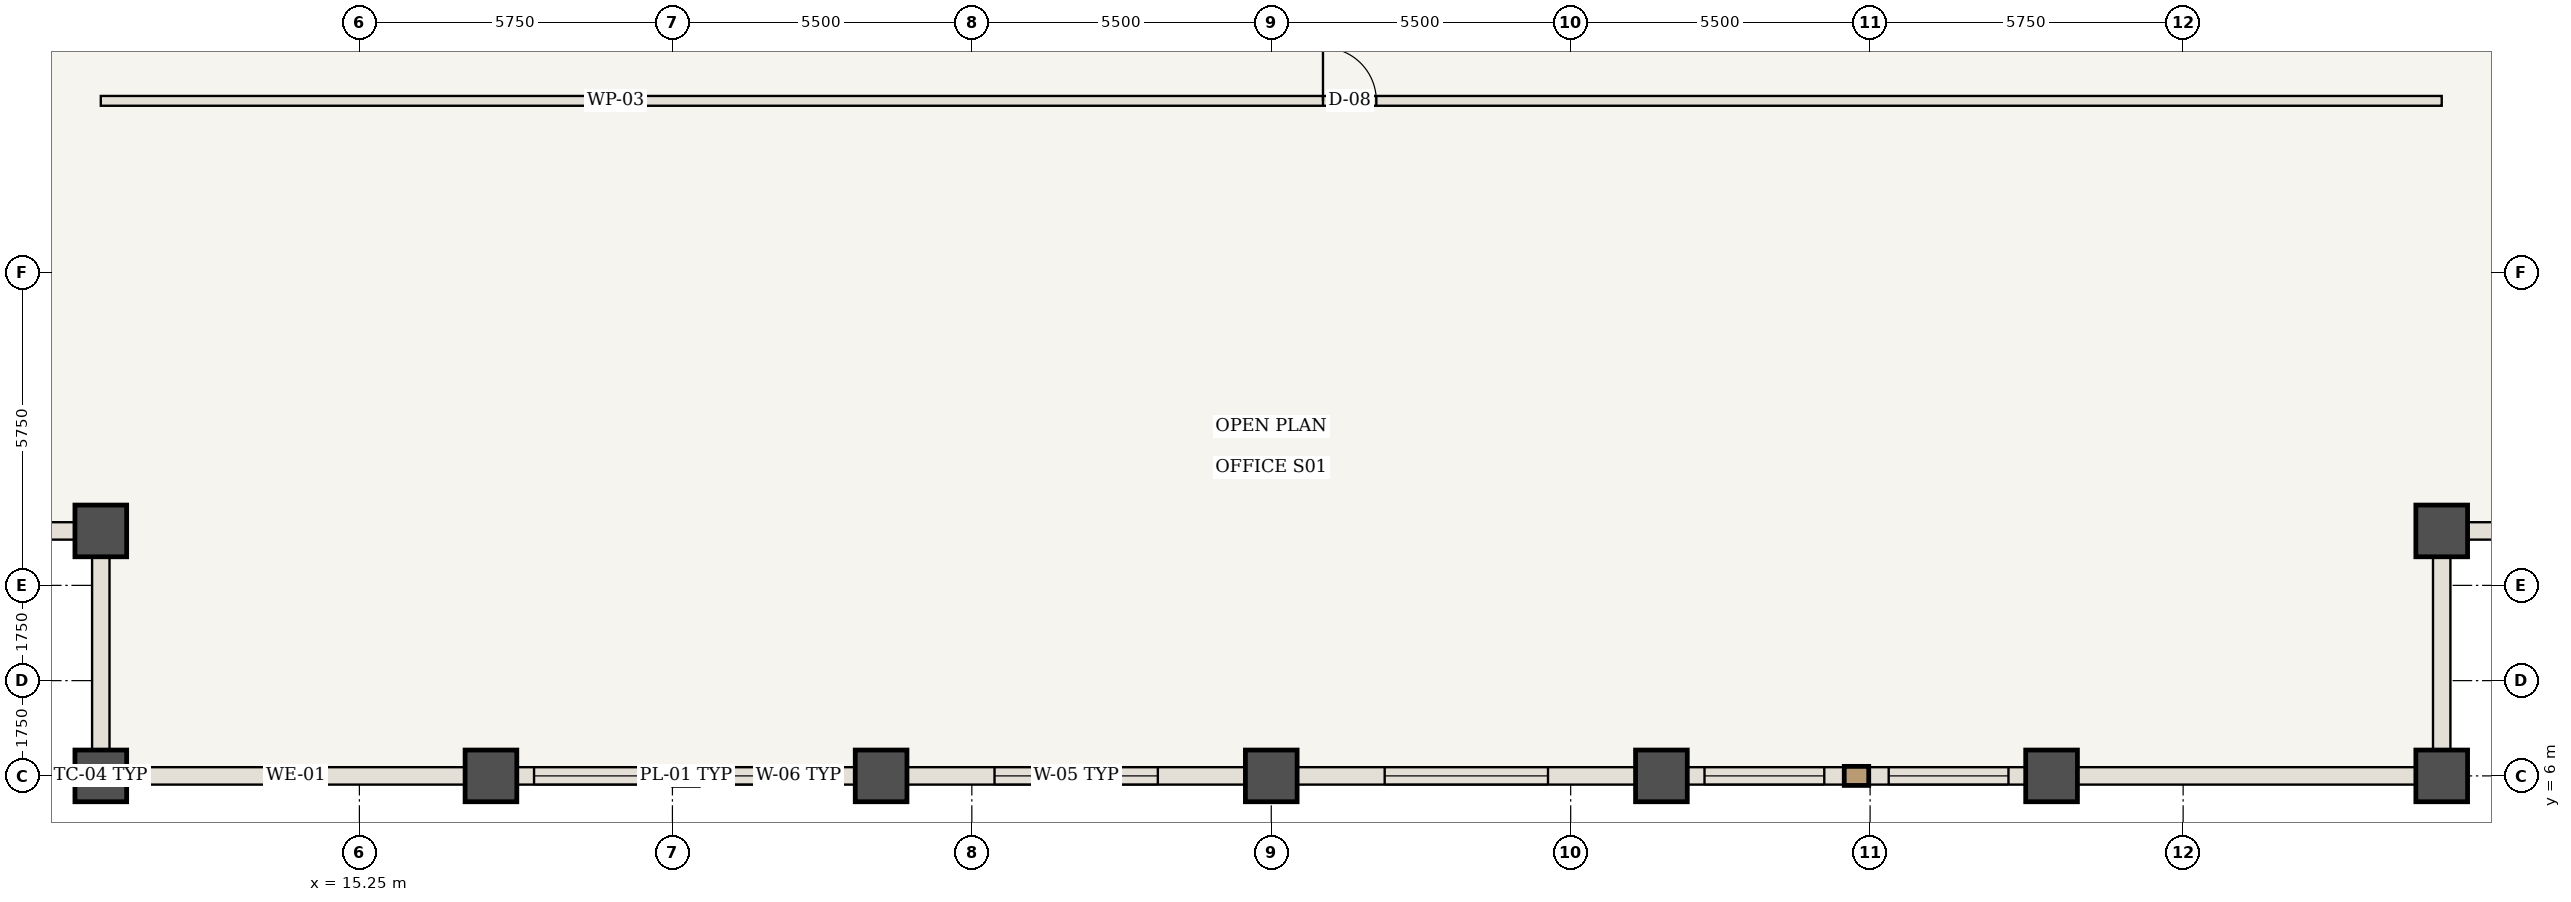
"""IFC4 building model, lengths in metres.
Left out: names, types, materials, properties, quantities, classifications, styles, units other than length and angle.
Written with IfcOpenShell. Run it as: python <this file> out.ifc"""

import sys

from ifc_helpers import new_model, si_unit, direction, frame, frame_2d, origin, origin_2d, place, context, subcontext, project, spatial, rectangle, extrude, element, fill, save


model = new_model("IFC4")
c1 = context("Model", 3, precision=1e-05, world=origin(), true_north=direction((0.0, 1.0)))
c2 = subcontext(c1, "Body", "Model", "MODEL_VIEW")
j1 = project(units=[si_unit("LENGTHUNIT", "METRE"), si_unit("PLANEANGLEUNIT", "RADIAN")], contexts=[c1])
p1 = place(None, origin())
s1 = spatial("IfcSite", under=j1, at=p1, CompositionType="ELEMENT")
p2 = place(p1, origin())
s2 = spatial("IfcBuilding", under=s1, at=p2, CompositionType="ELEMENT")
p3 = place(p2, frame((0.0, 0.0, 118.3)))
s3 = spatial("IfcBuildingStorey", under=s2, at=p3, CompositionType="ELEMENT", Elevation=118.3)
for number, where, z_axis, x_axis in (
    (1, (10.5, 6.0, 0.0), (0.0, 0.0, 1.0), (1.0, 0.0, 0.0)),
    (2, (10.5, 10.5, 0.0), (0.0, 0.0, 1.0), (1.0, 0.0, 0.0)),
    (3, (53.5, 6.0, 0.0), (0.0, 0.0, 1.0), (1.0, 0.0, 0.0)),
    (4, (53.5, 10.5, 0.0), (0.0, 0.0, 1.0), (1.0, 0.0, 0.0)),
    (5, (17.667, 6.0, 0.0), (0.0, 0.0, 1.0), (1.0, 0.0, 0.0)),
    (6, (24.833, 6.0, 0.0), (0.0, 0.0, 1.0), (1.0, 0.0, 0.0)),
    (7, (32.0, 6.0, 0.0), (0.0, 0.0, 1.0), (1.0, 0.0, 0.0)),
    (8, (39.167, 6.0, 0.0), (0.0, 0.0, 1.0), (1.0, 0.0, 0.0)),
    (9, (46.333, 6.0, 0.0), (0.0, 0.0, 1.0), (1.0, 0.0, 0.0)),
):
    element("IfcColumn", number, at=place(p3, frame(where, z_axis=z_axis, x_axis=x_axis)), inside=s3, PredefinedType="COLUMN", context=c2, shape_type="SweptSolid", body=[
        extrude(rectangle(XDim=0.95, YDim=0.95, at=origin_2d()), origin(), (0.0, 0.0, 1.0), 3.85),
    ])
p4 = place(p3, frame((10.5, 18.4, 0.0), z_axis=(0.0, 0.0, 1.0), x_axis=(1.0, 0.0, 0.0)))
e10 = element("IfcWall", 10, at=p4, inside=s3, PredefinedType="STANDARD", context=c2, shape_type="SweptSolid", body=[
    extrude(rectangle(XDim=43.0, YDim=0.18, at=frame_2d((21.5, 0.0))), origin(), (0.0, 0.0, 1.0), 3.685),
])
p5 = place(p4, frame((22.45, 0.0, 0.0)))
e11 = element("IfcOpeningElement", 11, at=p5, cuts=e10, PredefinedType="OPENING", context=c2, shape_type="SweptSolid", body=[
    extrude(rectangle(XDim=0.98, YDim=2.2, at=frame_2d((0.49, 1.1))), frame((0.0, 0.1, 0.0), z_axis=(0.0, -1.0, 0.0), x_axis=(1.0, 0.0, 0.0)), (0.0, 0.0, 1.0), 0.2),
])
p6 = place(p3, frame((17.667, 6.0, 0.0), z_axis=(0.0, 0.0, 1.0), x_axis=(-1.0, 0.0, 0.0)))
e12 = element("IfcWall", 12, at=p6, inside=s3, PredefinedType="USERDEFINED", context=c2, shape_type="SweptSolid", body=[
    extrude(rectangle(XDim=7.167, YDim=0.32, at=frame_2d((3.583, 0.0))), origin(), (0.0, 0.0, 1.0), 2.885),
])
p7 = place(p3, frame((24.833, 6.0, 0.0), z_axis=(0.0, 0.0, 1.0), x_axis=(-1.0, 0.0, 0.0)))
e13 = element("IfcWall", 13, at=p7, inside=s3, PredefinedType="USERDEFINED", context=c2, shape_type="SweptSolid", body=[
    extrude(rectangle(XDim=7.167, YDim=0.32, at=frame_2d((3.583, 0.0))), origin(), (0.0, 0.0, 1.0), 2.885),
])
p8 = place(p7, frame((0.792, 0.0, 0.85)))
e14 = element("IfcOpeningElement", 14, at=p8, cuts=e13, PredefinedType="OPENING", context=c2, shape_type="SweptSolid", body=[
    extrude(rectangle(XDim=2.2, YDim=1.835, at=frame_2d((1.1, 0.917))), frame((0.0, 0.17, 0.0), z_axis=(0.0, -1.0, 0.0), x_axis=(1.0, 0.0, 0.0)), (0.0, 0.0, 1.0), 0.34),
])
p9 = place(p7, frame((4.175, 0.0, 0.85)))
e15 = element("IfcOpeningElement", 15, at=p9, cuts=e13, PredefinedType="OPENING", context=c2, shape_type="SweptSolid", body=[
    extrude(rectangle(XDim=2.2, YDim=1.835, at=frame_2d((1.1, 0.917))), frame((0.0, 0.17, 0.0), z_axis=(0.0, -1.0, 0.0), x_axis=(1.0, 0.0, 0.0)), (0.0, 0.0, 1.0), 0.34),
])
p10 = place(p3, frame((32.0, 6.0, 0.0), z_axis=(0.0, 0.0, 1.0), x_axis=(-1.0, 0.0, 0.0)))
e16 = element("IfcWall", 16, at=p10, inside=s3, PredefinedType="USERDEFINED", context=c2, shape_type="SweptSolid", body=[
    extrude(rectangle(XDim=7.167, YDim=0.32, at=frame_2d((3.583, 0.0))), origin(), (0.0, 0.0, 1.0), 2.885),
])
p11 = place(p10, frame((2.083, 0.0, 0.85)))
e17 = element("IfcOpeningElement", 17, at=p11, cuts=e16, PredefinedType="OPENING", context=c2, shape_type="SweptSolid", body=[
    extrude(rectangle(XDim=3.0, YDim=1.835, at=frame_2d((1.5, 0.917))), frame((0.0, 0.17, 0.0), z_axis=(0.0, -1.0, 0.0), x_axis=(1.0, 0.0, 0.0)), (0.0, 0.0, 1.0), 0.34),
])
p12 = place(p3, frame((39.167, 6.0, 0.0), z_axis=(0.0, 0.0, 1.0), x_axis=(-1.0, 0.0, 0.0)))
e18 = element("IfcWall", 18, at=p12, inside=s3, PredefinedType="USERDEFINED", context=c2, shape_type="SweptSolid", body=[
    extrude(rectangle(XDim=7.167, YDim=0.32, at=frame_2d((3.583, 0.0))), origin(), (0.0, 0.0, 1.0), 2.885),
])
p13 = place(p12, frame((2.083, 0.0, 0.85)))
e19 = element("IfcOpeningElement", 19, at=p13, cuts=e18, PredefinedType="OPENING", context=c2, shape_type="SweptSolid", body=[
    extrude(rectangle(XDim=3.0, YDim=1.835, at=frame_2d((1.5, 0.917))), frame((0.0, 0.17, 0.0), z_axis=(0.0, -1.0, 0.0), x_axis=(1.0, 0.0, 0.0)), (0.0, 0.0, 1.0), 0.34),
])
p14 = place(p3, frame((46.333, 6.0, 0.0), z_axis=(0.0, 0.0, 1.0), x_axis=(-1.0, 0.0, 0.0)))
e20 = element("IfcWall", 20, at=p14, inside=s3, PredefinedType="USERDEFINED", context=c2, shape_type="SweptSolid", body=[
    extrude(rectangle(XDim=7.167, YDim=0.32, at=frame_2d((3.583, 0.0))), origin(), (0.0, 0.0, 1.0), 2.885),
])
p15 = place(p14, frame((0.792, 0.0, 0.85)))
e21 = element("IfcOpeningElement", 21, at=p15, cuts=e20, PredefinedType="OPENING", context=c2, shape_type="SweptSolid", body=[
    extrude(rectangle(XDim=2.2, YDim=1.835, at=frame_2d((1.1, 0.917))), frame((0.0, 0.17, 0.0), z_axis=(0.0, -1.0, 0.0), x_axis=(1.0, 0.0, 0.0)), (0.0, 0.0, 1.0), 0.34),
])
p16 = place(p14, frame((4.175, 0.0, 0.85)))
e22 = element("IfcOpeningElement", 22, at=p16, cuts=e20, PredefinedType="OPENING", context=c2, shape_type="SweptSolid", body=[
    extrude(rectangle(XDim=2.2, YDim=1.835, at=frame_2d((1.1, 0.917))), frame((0.0, 0.17, 0.0), z_axis=(0.0, -1.0, 0.0), x_axis=(1.0, 0.0, 0.0)), (0.0, 0.0, 1.0), 0.34),
])
p17 = place(p3, frame((53.5, 6.0, 0.0), z_axis=(0.0, 0.0, 1.0), x_axis=(-1.0, 0.0, 0.0)))
e23 = element("IfcWall", 23, at=p17, inside=s3, PredefinedType="USERDEFINED", context=c2, shape_type="SweptSolid", body=[
    extrude(rectangle(XDim=7.167, YDim=0.32, at=frame_2d((3.583, 0.0))), origin(), (0.0, 0.0, 1.0), 2.885),
])
for number, where, z_axis, x_axis in (
    (24, (10.5, 6.0, 0.0), (0.0, 0.0, 1.0), (0.0, 1.0, 0.0)),
    (25, (10.5, 10.5, 0.0), (0.0, 0.0, 1.0), (-1.0, 0.0, 0.0)),
    (26, (53.5, 10.5, 0.0), (0.0, 0.0, 1.0), (0.0, -1.0, 0.0)),
    (27, (58.0, 10.5, 0.0), (0.0, 0.0, 1.0), (-1.0, 0.0, 0.0)),
):
    element("IfcWall", number, at=place(p3, frame(where, z_axis=z_axis, x_axis=x_axis)), inside=s3, PredefinedType="USERDEFINED", context=c2, shape_type="SweptSolid", body=[
        extrude(rectangle(XDim=4.5, YDim=0.32, at=frame_2d((2.25, 0.0))), origin(), (0.0, 0.0, 1.0), 2.885),
    ])
p18 = place(p5, origin())
e28 = element("IfcDoor", 28, at=p18, inside=s3, OperationType="SINGLE_SWING_LEFT", PredefinedType="DOOR", context=c2, shape_type="SweptSolid", body=[
    extrude(rectangle(XDim=0.98, YDim=2.2, at=frame_2d((0.49, 1.1))), frame((0.0, 0.025, 0.0), z_axis=(0.0, -1.0, 0.0), x_axis=(1.0, 0.0, 0.0)), (0.0, 0.0, 1.0), 0.05),
])
fill(e11, e28)
p19 = place(p8, origin())
e29 = element("IfcWindow", 29, at=p19, inside=s3, PartitioningType="SINGLE_PANEL", PredefinedType="WINDOW", context=c2, shape_type="SweptSolid", body=[
    extrude(rectangle(XDim=2.2, YDim=1.835, at=frame_2d((1.1, 0.917))), frame((0.0, 0.03, 0.0), z_axis=(0.0, -1.0, 0.0), x_axis=(1.0, 0.0, 0.0)), (0.0, 0.0, 1.0), 0.06),
])
fill(e14, e29)
p20 = place(p9, origin())
e30 = element("IfcWindow", 30, at=p20, inside=s3, PartitioningType="SINGLE_PANEL", PredefinedType="WINDOW", context=c2, shape_type="SweptSolid", body=[
    extrude(rectangle(XDim=2.2, YDim=1.835, at=frame_2d((1.1, 0.917))), frame((0.0, 0.03, 0.0), z_axis=(0.0, -1.0, 0.0), x_axis=(1.0, 0.0, 0.0)), (0.0, 0.0, 1.0), 0.06),
])
fill(e15, e30)
p21 = place(p11, origin())
e31 = element("IfcWindow", 31, at=p21, inside=s3, PartitioningType="SINGLE_PANEL", PredefinedType="WINDOW", context=c2, shape_type="SweptSolid", body=[
    extrude(rectangle(XDim=3.0, YDim=1.835, at=frame_2d((1.5, 0.917))), frame((0.0, 0.03, 0.0), z_axis=(0.0, -1.0, 0.0), x_axis=(1.0, 0.0, 0.0)), (0.0, 0.0, 1.0), 0.06),
])
fill(e17, e31)
p22 = place(p13, origin())
e32 = element("IfcWindow", 32, at=p22, inside=s3, PartitioningType="SINGLE_PANEL", PredefinedType="WINDOW", context=c2, shape_type="SweptSolid", body=[
    extrude(rectangle(XDim=3.0, YDim=1.835, at=frame_2d((1.5, 0.917))), frame((0.0, 0.03, 0.0), z_axis=(0.0, -1.0, 0.0), x_axis=(1.0, 0.0, 0.0)), (0.0, 0.0, 1.0), 0.06),
])
fill(e19, e32)
p23 = place(p15, origin())
e33 = element("IfcWindow", 33, at=p23, inside=s3, PartitioningType="SINGLE_PANEL", PredefinedType="WINDOW", context=c2, shape_type="SweptSolid", body=[
    extrude(rectangle(XDim=2.2, YDim=1.835, at=frame_2d((1.1, 0.917))), frame((0.0, 0.03, 0.0), z_axis=(0.0, -1.0, 0.0), x_axis=(1.0, 0.0, 0.0)), (0.0, 0.0, 1.0), 0.06),
])
fill(e21, e33)
p24 = place(p16, origin())
e34 = element("IfcWindow", 34, at=p24, inside=s3, PartitioningType="SINGLE_PANEL", PredefinedType="WINDOW", context=c2, shape_type="SweptSolid", body=[
    extrude(rectangle(XDim=2.2, YDim=1.835, at=frame_2d((1.1, 0.917))), frame((0.0, 0.03, 0.0), z_axis=(0.0, -1.0, 0.0), x_axis=(1.0, 0.0, 0.0)), (0.0, 0.0, 1.0), 0.06),
])
fill(e22, e34)
save(model, sys.argv[1])
